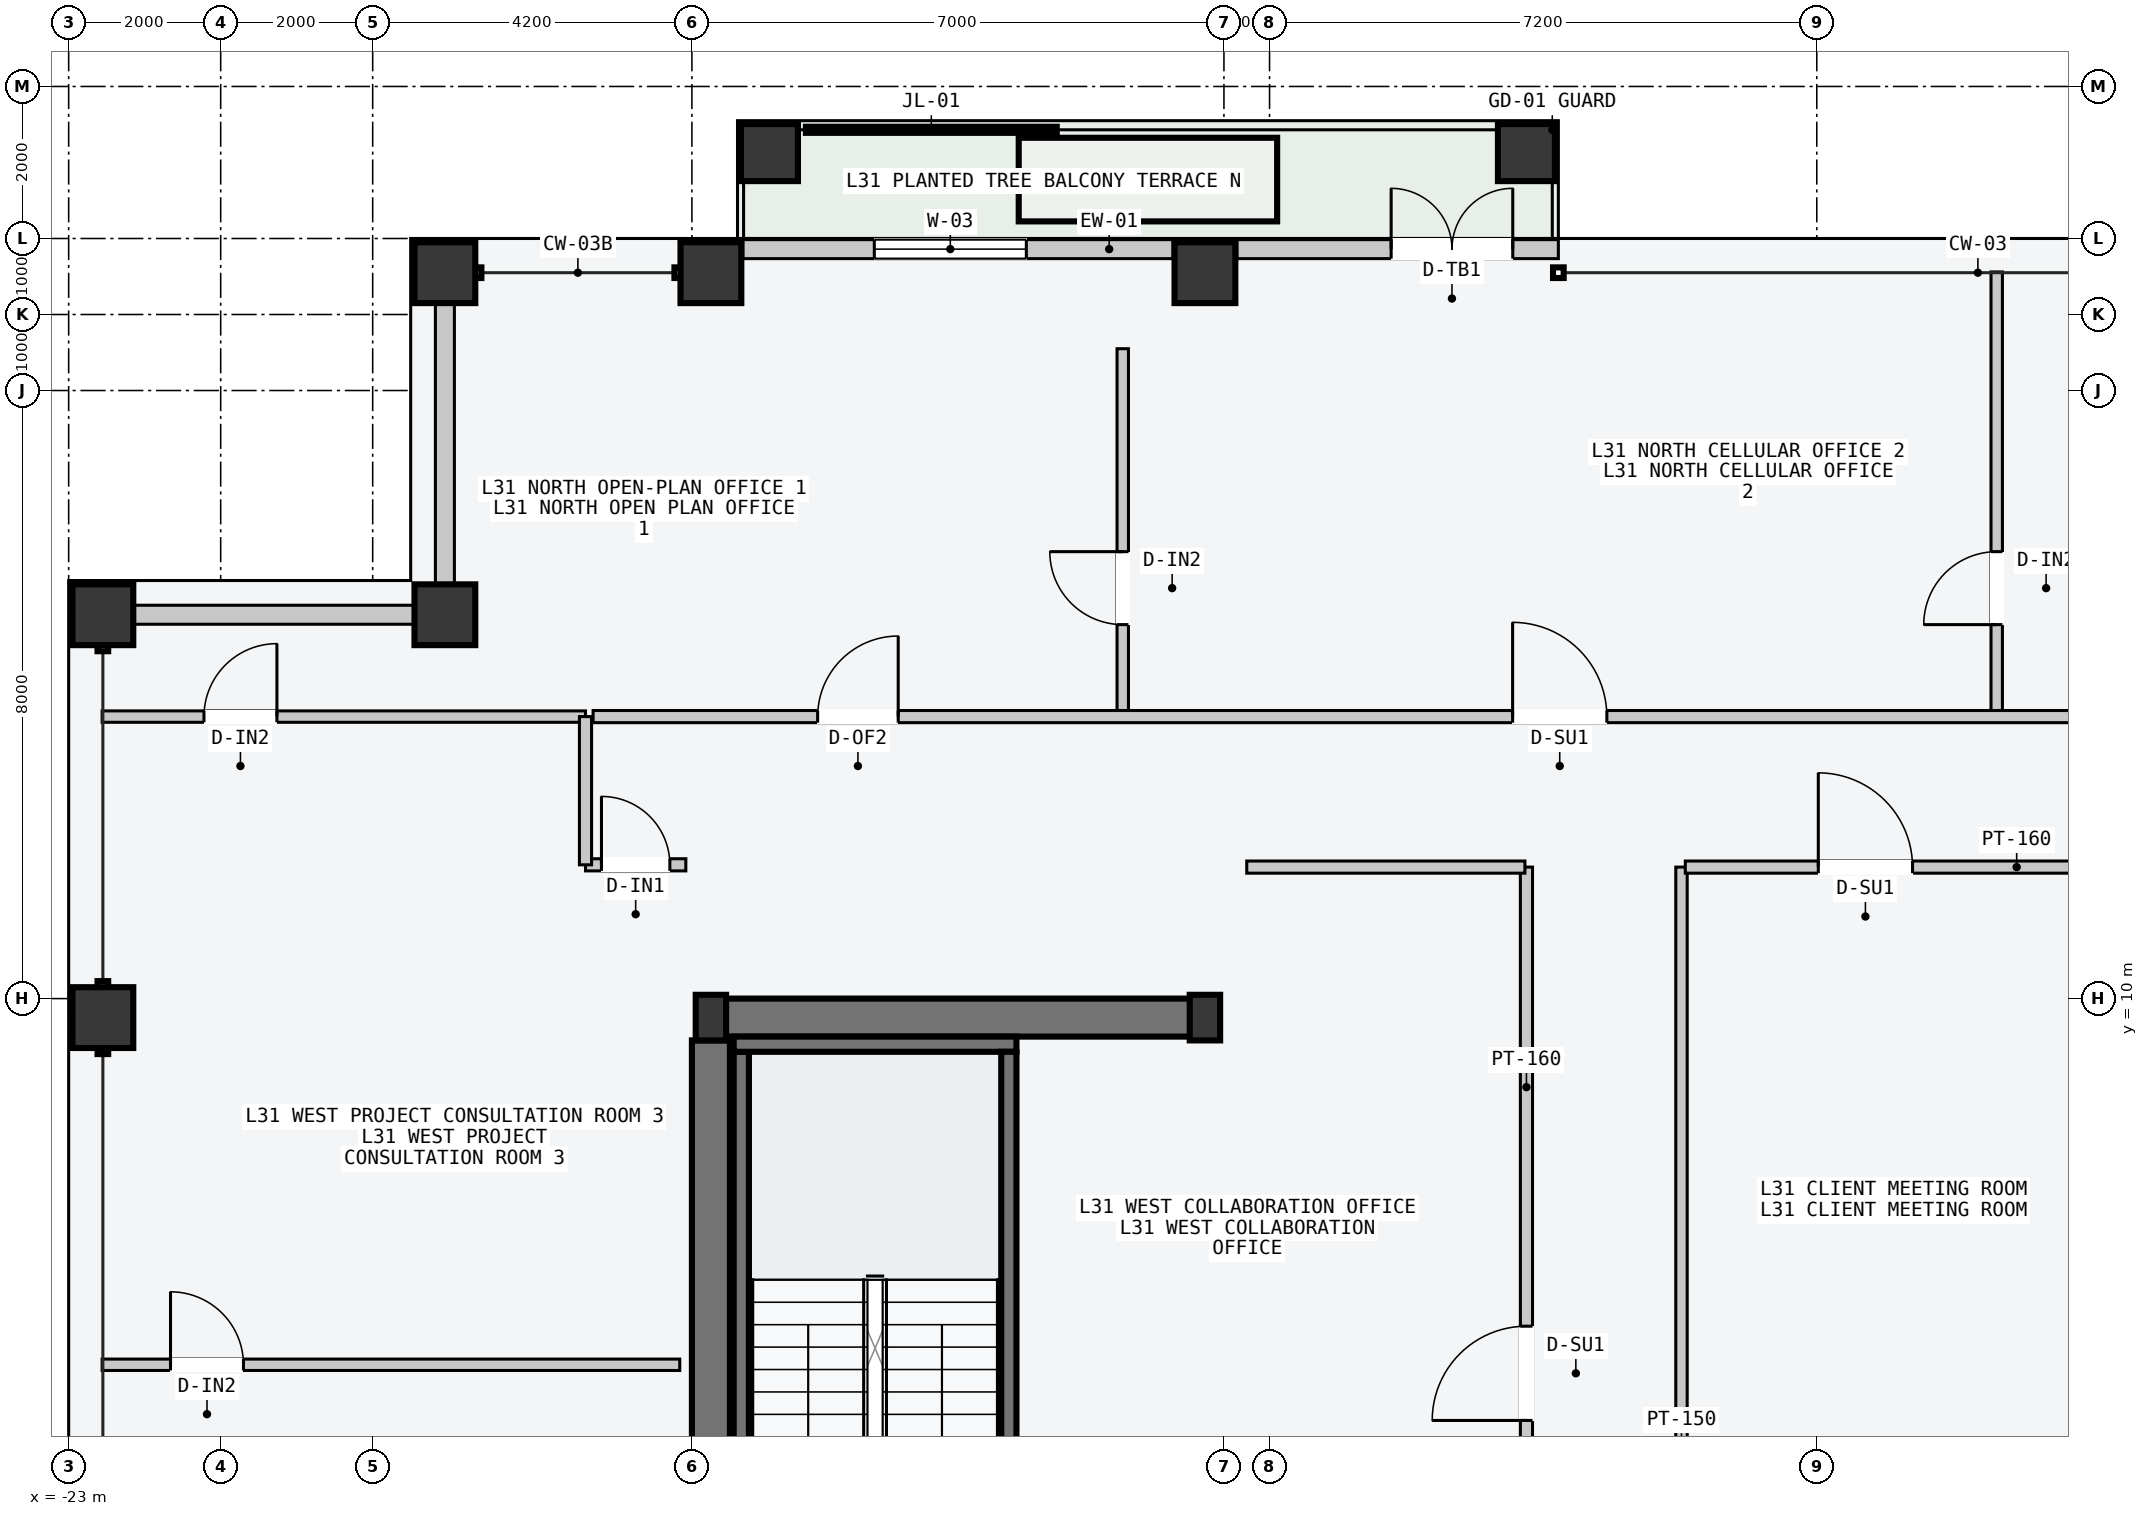
"""IFC4 building model, lengths in metres.
Left out: names, types, materials, properties, quantities, classifications, styles, units other than length and angle.
Written with IfcOpenShell. Run it as: python <this file> out.ifc"""

import sys

from ifc_helpers import new_model, si_unit, direction, frame, frame_2d, origin, origin_2d, place, context, subcontext, project, spatial, rectangle, hollow_rectangle, i_section, extrude, element, fill, save


model = new_model("IFC4")
c1 = context("Model", 3, precision=1e-05, world=origin(), true_north=direction((0.0, 1.0)))
c2 = subcontext(c1, "Body", "Model", "MODEL_VIEW")
j1 = project(units=[si_unit("LENGTHUNIT", "METRE"), si_unit("PLANEANGLEUNIT", "RADIAN")], contexts=[c1])
p1 = place(None, origin())
s1 = spatial("IfcSite", under=j1, at=p1, CompositionType="ELEMENT")
p2 = place(p1, origin())
s2 = spatial("IfcBuilding", under=s1, at=p2, CompositionType="ELEMENT")
p3 = place(p2, frame((0.0, 0.0, 120.6)))
s3 = spatial("IfcBuildingStorey", under=s2, at=p3, CompositionType="ELEMENT", Elevation=120.6)
p4 = place(p3, frame((-14.53, 9.75, -0.2), z_axis=(0.0, 0.0, 1.0), x_axis=(1.0, 0.0, 0.0)))
e1 = element("IfcWall", 1, at=p4, inside=s3, PredefinedType="SHEAR", context=c2, shape_type="SweptSolid", body=[
    extrude(rectangle(XDim=6.46, YDim=0.5, at=frame_2d((3.23, 0.0))), origin(), (0.0, 0.0, 1.0), 3.6),
])
p5 = place(p3, frame((-14.55, 0.3, -0.2), z_axis=(0.0, 0.0, 1.0), x_axis=(0.0, 1.0, 0.0)))
e2 = element("IfcWall", 2, at=p5, inside=s3, PredefinedType="SHEAR", context=c2, shape_type="SweptSolid", body=[
    extrude(rectangle(XDim=9.15, YDim=0.5, at=frame_2d((4.575, 0.0))), origin(), (0.0, 0.0, 1.0), 3.6),
])
p6 = place(p3, frame((-14.15, 1.5, -0.2), z_axis=(0.0, 0.0, 1.0), x_axis=(0.0, 1.0, 0.0)))
e3 = element("IfcWall", 3, at=p6, inside=s3, PredefinedType="SOLIDWALL", context=c2, shape_type="SweptSolid", body=[
    extrude(rectangle(XDim=7.8, YDim=0.2, at=frame_2d((3.9, 0.0))), origin(), (0.0, 0.0, 1.0), 3.6),
])
p7 = place(p3, frame((-14.25, 9.4, -0.2), z_axis=(0.0, 0.0, 1.0), x_axis=(1.0, 0.0, 0.0)))
e4 = element("IfcWall", 4, at=p7, inside=s3, PredefinedType="SOLIDWALL", context=c2, shape_type="SweptSolid", body=[
    extrude(rectangle(XDim=3.72, YDim=0.2, at=frame_2d((1.86, 0.0))), origin(), (0.0, 0.0, 1.0), 3.6),
])
p8 = place(p3, frame((-10.63, 1.5, -0.2), z_axis=(0.0, 0.0, 1.0), x_axis=(0.0, 1.0, 0.0)))
e5 = element("IfcWall", 5, at=p8, inside=s3, PredefinedType="SOLIDWALL", context=c2, shape_type="SweptSolid", body=[
    extrude(rectangle(XDim=7.8, YDim=0.2, at=frame_2d((3.9, 0.0))), origin(), (0.0, 0.0, 1.0), 3.6),
])
for number, where, z_axis, x_axis in (
    (6, (-14.55, 9.75, 0.0), (0.0, 0.0, 1.0), (1.0, 0.0, 0.0)),
    (7, (-8.05, 9.75, 0.0), (0.0, 0.0, 1.0), (1.0, 0.0, 0.0)),
):
    element("IfcColumn", number, at=place(p3, frame(where, z_axis=z_axis, x_axis=x_axis)), inside=s3, PredefinedType="COLUMN", context=c2, shape_type="SweptSolid", body=[
        extrude(i_section(OverallWidth=0.4, OverallDepth=0.6, WebThickness=0.022, FlangeThickness=0.036, at=origin_2d()), origin(), (0.0, 0.0, 1.0), 3.6),
    ])
for number, where, z_axis, x_axis in (
    (8, (-18.05, 19.55, 0.0), (0.0, 0.0, 1.0), (1.0, 0.0, 0.0)),
    (9, (-14.55, 19.55, 0.0), (0.0, 0.0, 1.0), (1.0, 0.0, 0.0)),
    (10, (-8.05, 19.55, 0.0), (0.0, 0.0, 1.0), (1.0, 0.0, 0.0)),
    (11, (-22.55, 9.75, 0.0), (0.0, 0.0, 1.0), (0.0, 1.0, 0.0)),
    (12, (-22.55, 15.05, 0.0), (0.0, 0.0, 1.0), (0.0, 1.0, 0.0)),
    (13, (-18.05, 15.05, 0.0), (0.0, 0.0, 1.0), (1.0, 0.0, 0.0)),
):
    element("IfcColumn", number, at=place(p3, frame(where, z_axis=z_axis, x_axis=x_axis)), inside=s3, PredefinedType="COLUMN", context=c2, shape_type="SweptSolid", body=[
        extrude(hollow_rectangle(XDim=0.8, YDim=0.8, WallThickness=0.036, at=origin_2d()), origin(), (0.0, 0.0, 1.0), 3.6),
    ])
for number, where, z_axis, x_axis in (
    (14, (-13.78, 21.13, -0.2), (0.0, 0.0, 1.0), (1.0, 0.0, 0.0)),
    (15, (-3.82, 21.13, -0.2), (0.0, 0.0, 1.0), (1.0, 0.0, 0.0)),
):
    element("IfcColumn", number, at=place(p3, frame(where, z_axis=z_axis, x_axis=x_axis)), inside=s3, PredefinedType="COLUMN", context=c2, shape_type="SweptSolid", body=[
        extrude(hollow_rectangle(XDim=0.75, YDim=0.75, WallThickness=0.032, at=origin_2d()), origin(), (0.0, 0.0, 1.0), 3.8),
    ])
p9 = place(p3, frame((-14.13, 19.86, 0.0), z_axis=(0.0, 0.0, 1.0), x_axis=(1.0, 0.0, 0.0)))
e16 = element("IfcWall", 16, at=p9, inside=s3, PredefinedType="STANDARD", context=c2, shape_type="SweptSolid", body=[
    extrude(rectangle(XDim=5.66, YDim=0.25, at=frame_2d((2.83, 0.0))), origin(), (0.0, 0.0, 1.0), 3.4),
])
p10 = place(p9, frame((1.73, 0.0, 0.85)))
e17 = element("IfcOpeningElement", 17, at=p10, cuts=e16, PredefinedType="OPENING", context=c2, shape_type="SweptSolid", body=[
    extrude(rectangle(XDim=2.0, YDim=2.1, at=frame_2d((1.0, 1.05))), frame((0.0, 0.135, 0.0), z_axis=(0.0, -1.0, 0.0), x_axis=(1.0, 0.0, 0.0)), (0.0, 0.0, 1.0), 0.27),
])
p11 = place(p3, frame((-7.63, 19.86, 0.0), z_axis=(0.0, 0.0, 1.0), x_axis=(1.0, 0.0, 0.0)))
e18 = element("IfcWall", 18, at=p11, inside=s3, PredefinedType="STANDARD", context=c2, shape_type="SweptSolid", body=[
    extrude(rectangle(XDim=4.23, YDim=0.25, at=frame_2d((2.115, 0.0))), origin(), (0.0, 0.0, 1.0), 3.4),
])
p12 = place(p11, frame((2.03, 0.0, 0.0)))
e19 = element("IfcOpeningElement", 19, at=p12, cuts=e18, PredefinedType="OPENING", context=c2, shape_type="SweptSolid", body=[
    extrude(rectangle(XDim=1.6, YDim=2.2, at=frame_2d((0.8, 1.1))), frame((0.0, 0.135, 0.0), z_axis=(0.0, -1.0, 0.0), x_axis=(1.0, 0.0, 0.0)), (0.0, 0.0, 1.0), 0.27),
])
for number, where, z_axis, x_axis in (
    (20, (-22.14, 15.05, 0.0), (0.0, 0.0, 1.0), (1.0, 0.0, 0.0)),
    (21, (-18.05, 15.46, 0.0), (0.0, 0.0, 1.0), (0.0, 1.0, 0.0)),
):
    element("IfcWall", number, at=place(p3, frame(where, z_axis=z_axis, x_axis=x_axis)), inside=s3, PredefinedType="STANDARD", context=c2, shape_type="SweptSolid", body=[
        extrude(rectangle(XDim=3.68, YDim=0.25, at=frame_2d((1.84, 0.0))), origin(), (0.0, 0.0, 1.0), 2.75),
    ])
p13 = place(p3, frame((-3.82, 1.05, 0.0), z_axis=(0.0, 0.0, 1.0), x_axis=(0.0, 1.0, 0.0)))
e22 = element("IfcWall", 22, at=p13, inside=s3, PredefinedType="PARTITIONING", context=c2, shape_type="SweptSolid", body=[
    extrude(rectangle(XDim=10.68, YDim=0.16, at=frame_2d((5.34, 0.0))), origin(), (0.0, 0.0, 1.0), 3.4),
])
p14 = place(p13, frame((3.4, 0.0, 0.0)))
e23 = element("IfcOpeningElement", 23, at=p14, cuts=e22, PredefinedType="OPENING", context=c2, shape_type="SweptSolid", body=[
    extrude(rectangle(XDim=1.24, YDim=2.24, at=frame_2d((0.62, 1.12))), frame((0.0, 0.09, 0.0), z_axis=(0.0, -1.0, 0.0), x_axis=(1.0, 0.0, 0.0)), (0.0, 0.0, 1.0), 0.18),
])
p15 = place(p3, frame((-7.5, 11.73, 0.0), z_axis=(0.0, 0.0, 1.0), x_axis=(1.0, 0.0, 0.0)))
e24 = element("IfcWall", 24, at=p15, inside=s3, PredefinedType="PARTITIONING", context=c2, shape_type="SweptSolid", body=[
    extrude(rectangle(XDim=3.66, YDim=0.16, at=frame_2d((1.83, 0.0))), origin(), (0.0, 0.0, 1.0), 3.4),
])
p16 = place(p3, frame((-1.78, -3.55, 0.0), z_axis=(0.0, 0.0, 1.0), x_axis=(0.0, 1.0, 0.0)))
e25 = element("IfcWall", 25, at=p16, inside=s3, PredefinedType="PARTITIONING", context=c2, shape_type="SweptSolid", body=[
    extrude(rectangle(XDim=15.28, YDim=0.15, at=frame_2d((7.64, 0.0))), origin(), (0.0, 0.0, 1.0), 3.4),
])
p17 = place(p3, frame((-1.73, 11.73, 0.0), z_axis=(0.0, 0.0, 1.0), x_axis=(1.0, 0.0, 0.0)))
e26 = element("IfcWall", 26, at=p17, inside=s3, PredefinedType="PARTITIONING", context=c2, shape_type="SweptSolid", body=[
    extrude(rectangle(XDim=5.48, YDim=0.16, at=frame_2d((2.74, 0.0))), origin(), (0.0, 0.0, 1.0), 3.4),
])
p18 = place(p17, frame((1.75, 0.0, 0.0)))
e27 = element("IfcOpeningElement", 27, at=p18, cuts=e26, PredefinedType="OPENING", context=c2, shape_type="SweptSolid", body=[
    extrude(rectangle(XDim=1.24, YDim=2.24, at=frame_2d((0.62, 1.12))), frame((0.0, 0.09, 0.0), z_axis=(0.0, -1.0, 0.0), x_axis=(1.0, 0.0, 0.0)), (0.0, 0.0, 1.0), 0.18),
])
p19 = place(p3, frame((-9.131, 13.77, 0.0), z_axis=(0.0, 0.0, 1.0), x_axis=(0.0, 1.0, 0.0)))
e28 = element("IfcWall", 28, at=p19, inside=s3, PredefinedType="PARTITIONING", context=c2, shape_type="SweptSolid", body=[
    extrude(rectangle(XDim=4.78, YDim=0.15, at=frame_2d((2.39, 0.0))), origin(), (0.0, 0.0, 1.0), 3.4),
])
p20 = place(p19, frame((1.15, 0.0, 0.0)))
e29 = element("IfcOpeningElement", 29, at=p20, cuts=e28, PredefinedType="OPENING", context=c2, shape_type="SweptSolid", body=[
    extrude(rectangle(XDim=0.96, YDim=2.18, at=frame_2d((0.48, 1.09))), frame((0.0, 0.085, 0.0), z_axis=(0.0, -1.0, 0.0), x_axis=(1.0, 0.0, 0.0)), (0.0, 0.0, 1.0), 0.17),
])
p21 = place(p3, frame((2.367, 13.77, 0.0), z_axis=(0.0, 0.0, 1.0), x_axis=(0.0, 1.0, 0.0)))
e30 = element("IfcWall", 30, at=p21, inside=s3, PredefinedType="PARTITIONING", context=c2, shape_type="SweptSolid", body=[
    extrude(rectangle(XDim=5.79, YDim=0.15, at=frame_2d((2.895, 0.0))), origin(), (0.0, 0.0, 1.0), 3.4),
])
p22 = place(p21, frame((1.15, 0.0, 0.0)))
e31 = element("IfcOpeningElement", 31, at=p22, cuts=e30, PredefinedType="OPENING", context=c2, shape_type="SweptSolid", body=[
    extrude(rectangle(XDim=0.96, YDim=2.18, at=frame_2d((0.48, 1.09))), frame((0.0, 0.085, 0.0), z_axis=(0.0, -1.0, 0.0), x_axis=(1.0, 0.0, 0.0)), (0.0, 0.0, 1.0), 0.17),
])
p23 = place(p3, frame((-16.1, 13.71, 0.0), z_axis=(0.0, 0.0, 1.0), x_axis=(1.0, 0.0, 0.0)))
e32 = element("IfcWall", 32, at=p23, inside=s3, PredefinedType="PARTITIONING", context=c2, shape_type="SweptSolid", body=[
    extrude(rectangle(XDim=32.2, YDim=0.16, at=frame_2d((16.1, 0.0))), origin(), (0.0, 0.0, 1.0), 3.4),
])
p24 = place(p23, frame((2.954, 0.0, 0.0)))
e33 = element("IfcOpeningElement", 33, at=p24, cuts=e32, PredefinedType="OPENING", context=c2, shape_type="SweptSolid", body=[
    extrude(rectangle(XDim=1.06, YDim=2.2, at=frame_2d((0.53, 1.1))), frame((0.0, 0.09, 0.0), z_axis=(0.0, -1.0, 0.0), x_axis=(1.0, 0.0, 0.0)), (0.0, 0.0, 1.0), 0.18),
])
p25 = place(p23, frame((12.098, 0.0, 0.0)))
e34 = element("IfcOpeningElement", 34, at=p25, cuts=e32, PredefinedType="OPENING", context=c2, shape_type="SweptSolid", body=[
    extrude(rectangle(XDim=1.24, YDim=2.24, at=frame_2d((0.62, 1.12))), frame((0.0, 0.09, 0.0), z_axis=(0.0, -1.0, 0.0), x_axis=(1.0, 0.0, 0.0)), (0.0, 0.0, 1.0), 0.18),
])
p26 = place(p23, frame((24.634, 0.0, 0.0)))
e35 = element("IfcOpeningElement", 35, at=p26, cuts=e32, PredefinedType="OPENING", context=c2, shape_type="SweptSolid", body=[
    extrude(rectangle(XDim=1.4, YDim=2.2, at=frame_2d((0.7, 1.1))), frame((0.0, 0.09, 0.0), z_axis=(0.0, -1.0, 0.0), x_axis=(1.0, 0.0, 0.0)), (0.0, 0.0, 1.0), 0.18),
])
p27 = place(p3, frame((-22.56, 13.71, 0.0), z_axis=(0.0, 0.0, 1.0), x_axis=(1.0, 0.0, 0.0)))
e36 = element("IfcWall", 36, at=p27, inside=s3, PredefinedType="PARTITIONING", context=c2, shape_type="SweptSolid", body=[
    extrude(rectangle(XDim=6.36, YDim=0.15, at=frame_2d((3.18, 0.0))), origin(), (0.0, 0.0, 1.0), 3.4),
])
p28 = place(p27, frame((1.34, 0.0, 0.0)))
e37 = element("IfcOpeningElement", 37, at=p28, cuts=e36, PredefinedType="OPENING", context=c2, shape_type="SweptSolid", body=[
    extrude(rectangle(XDim=0.96, YDim=2.18, at=frame_2d((0.48, 1.09))), frame((0.0, 0.085, 0.0), z_axis=(0.0, -1.0, 0.0), x_axis=(1.0, 0.0, 0.0)), (0.0, 0.0, 1.0), 0.17),
])
p29 = place(p3, frame((-16.2, 11.76, 0.0), z_axis=(0.0, 0.0, 1.0), x_axis=(1.0, 0.0, 0.0)))
e38 = element("IfcWall", 38, at=p29, inside=s3, PredefinedType="PARTITIONING", context=c2, shape_type="SweptSolid", body=[
    extrude(rectangle(XDim=1.32, YDim=0.16, at=frame_2d((0.66, 0.0))), origin(), (0.0, 0.0, 1.0), 3.4),
])
p30 = place(p29, frame((0.21, 0.0, 0.0)))
e39 = element("IfcOpeningElement", 39, at=p30, cuts=e38, PredefinedType="OPENING", context=c2, shape_type="SweptSolid", body=[
    extrude(rectangle(XDim=0.9, YDim=2.15, at=frame_2d((0.45, 1.075))), frame((0.0, 0.09, 0.0), z_axis=(0.0, -1.0, 0.0), x_axis=(1.0, 0.0, 0.0)), (0.0, 0.0, 1.0), 0.18),
])
p31 = place(p3, frame((-16.2, 11.76, 0.0), z_axis=(0.0, 0.0, 1.0), x_axis=(0.0, 1.0, 0.0)))
e40 = element("IfcWall", 40, at=p31, inside=s3, PredefinedType="PARTITIONING", context=c2, shape_type="SweptSolid", body=[
    extrude(rectangle(XDim=1.95, YDim=0.16, at=frame_2d((0.975, 0.0))), origin(), (0.0, 0.0, 1.0), 3.4),
])
p32 = place(p3, frame((-22.56, 5.183, 0.0), z_axis=(0.0, 0.0, 1.0), x_axis=(1.0, 0.0, 0.0)))
e41 = element("IfcWall", 41, at=p32, inside=s3, PredefinedType="PARTITIONING", context=c2, shape_type="SweptSolid", body=[
    extrude(rectangle(XDim=7.6, YDim=0.15, at=frame_2d((3.8, 0.0))), origin(), (0.0, 0.0, 1.0), 3.4),
])
p33 = place(p32, frame((0.9, 0.0, 0.0)))
e42 = element("IfcOpeningElement", 42, at=p33, cuts=e41, PredefinedType="OPENING", context=c2, shape_type="SweptSolid", body=[
    extrude(rectangle(XDim=0.96, YDim=2.18, at=frame_2d((0.48, 1.09))), frame((0.0, 0.085, 0.0), z_axis=(0.0, -1.0, 0.0), x_axis=(1.0, 0.0, 0.0)), (0.0, 0.0, 1.0), 0.17),
])
p34 = place(p10, origin())
e43 = element("IfcWindow", 43, at=p34, inside=s3, PartitioningType="SINGLE_PANEL", PredefinedType="WINDOW", context=c2, shape_type="SweptSolid", body=[
    extrude(rectangle(XDim=2.0, YDim=2.1, at=frame_2d((1.0, 1.05))), frame((0.0, 0.03, 0.0), z_axis=(0.0, -1.0, 0.0), x_axis=(1.0, 0.0, 0.0)), (0.0, 0.0, 1.0), 0.06),
])
fill(e17, e43)
p35 = place(p12, origin())
e44 = element("IfcDoor", 44, at=p35, inside=s3, OperationType="DOUBLE_DOOR_SINGLE_SWING", PredefinedType="DOOR", context=c2, shape_type="SweptSolid", body=[
    extrude(rectangle(XDim=1.6, YDim=2.2, at=frame_2d((0.8, 1.1))), frame((0.0, 0.025, 0.0), z_axis=(0.0, -1.0, 0.0), x_axis=(1.0, 0.0, 0.0)), (0.0, 0.0, 1.0), 0.05),
])
fill(e19, e44)
p36 = place(p14, origin())
e45 = element("IfcDoor", 45, at=p36, inside=s3, OperationType="SINGLE_SWING_LEFT", PredefinedType="DOOR", context=c2, shape_type="SweptSolid", body=[
    extrude(rectangle(XDim=1.24, YDim=2.24, at=frame_2d((0.62, 1.12))), frame((0.0, 0.025, 0.0), z_axis=(0.0, -1.0, 0.0), x_axis=(1.0, 0.0, 0.0)), (0.0, 0.0, 1.0), 0.05),
])
fill(e23, e45)
p37 = place(p18, origin())
e46 = element("IfcDoor", 46, at=p37, inside=s3, OperationType="SINGLE_SWING_LEFT", PredefinedType="DOOR", context=c2, shape_type="SweptSolid", body=[
    extrude(rectangle(XDim=1.24, YDim=2.24, at=frame_2d((0.62, 1.12))), frame((0.0, 0.025, 0.0), z_axis=(0.0, -1.0, 0.0), x_axis=(1.0, 0.0, 0.0)), (0.0, 0.0, 1.0), 0.05),
])
fill(e27, e46)
p38 = place(p20, origin())
e47 = element("IfcDoor", 47, at=p38, inside=s3, OperationType="SINGLE_SWING_RIGHT", PredefinedType="DOOR", context=c2, shape_type="SweptSolid", body=[
    extrude(rectangle(XDim=0.96, YDim=2.18, at=frame_2d((0.48, 1.09))), frame((0.0, 0.025, 0.0), z_axis=(0.0, -1.0, 0.0), x_axis=(1.0, 0.0, 0.0)), (0.0, 0.0, 1.0), 0.05),
])
fill(e29, e47)
p39 = place(p22, origin())
e48 = element("IfcDoor", 48, at=p39, inside=s3, OperationType="SINGLE_SWING_LEFT", PredefinedType="DOOR", context=c2, shape_type="SweptSolid", body=[
    extrude(rectangle(XDim=0.96, YDim=2.18, at=frame_2d((0.48, 1.09))), frame((0.0, 0.025, 0.0), z_axis=(0.0, -1.0, 0.0), x_axis=(1.0, 0.0, 0.0)), (0.0, 0.0, 1.0), 0.05),
])
fill(e31, e48)
p40 = place(p24, origin())
e49 = element("IfcDoor", 49, at=p40, inside=s3, OperationType="SINGLE_SWING_RIGHT", PredefinedType="DOOR", context=c2, shape_type="SweptSolid", body=[
    extrude(rectangle(XDim=1.06, YDim=2.2, at=frame_2d((0.53, 1.1))), frame((0.0, 0.025, 0.0), z_axis=(0.0, -1.0, 0.0), x_axis=(1.0, 0.0, 0.0)), (0.0, 0.0, 1.0), 0.05),
])
fill(e33, e49)
p41 = place(p25, origin())
e50 = element("IfcDoor", 50, at=p41, inside=s3, OperationType="SINGLE_SWING_LEFT", PredefinedType="DOOR", context=c2, shape_type="SweptSolid", body=[
    extrude(rectangle(XDim=1.24, YDim=2.24, at=frame_2d((0.62, 1.12))), frame((0.0, 0.025, 0.0), z_axis=(0.0, -1.0, 0.0), x_axis=(1.0, 0.0, 0.0)), (0.0, 0.0, 1.0), 0.05),
])
fill(e34, e50)
p42 = place(p28, origin())
e51 = element("IfcDoor", 51, at=p42, inside=s3, OperationType="SINGLE_SWING_RIGHT", PredefinedType="DOOR", context=c2, shape_type="SweptSolid", body=[
    extrude(rectangle(XDim=0.96, YDim=2.18, at=frame_2d((0.48, 1.09))), frame((0.0, 0.025, 0.0), z_axis=(0.0, -1.0, 0.0), x_axis=(1.0, 0.0, 0.0)), (0.0, 0.0, 1.0), 0.05),
])
fill(e37, e51)
p43 = place(p30, origin())
e52 = element("IfcDoor", 52, at=p43, inside=s3, OperationType="SINGLE_SWING_LEFT", PredefinedType="DOOR", context=c2, shape_type="SweptSolid", body=[
    extrude(rectangle(XDim=0.9, YDim=2.15, at=frame_2d((0.45, 1.075))), frame((0.0, 0.025, 0.0), z_axis=(0.0, -1.0, 0.0), x_axis=(1.0, 0.0, 0.0)), (0.0, 0.0, 1.0), 0.05),
])
fill(e39, e52)
p44 = place(p33, origin())
e53 = element("IfcDoor", 53, at=p44, inside=s3, OperationType="SINGLE_SWING_LEFT", PredefinedType="DOOR", context=c2, shape_type="SweptSolid", body=[
    extrude(rectangle(XDim=0.96, YDim=2.18, at=frame_2d((0.48, 1.09))), frame((0.0, 0.025, 0.0), z_axis=(0.0, -1.0, 0.0), x_axis=(1.0, 0.0, 0.0)), (0.0, 0.0, 1.0), 0.05),
])
fill(e42, e53)
save(model, sys.argv[1])
